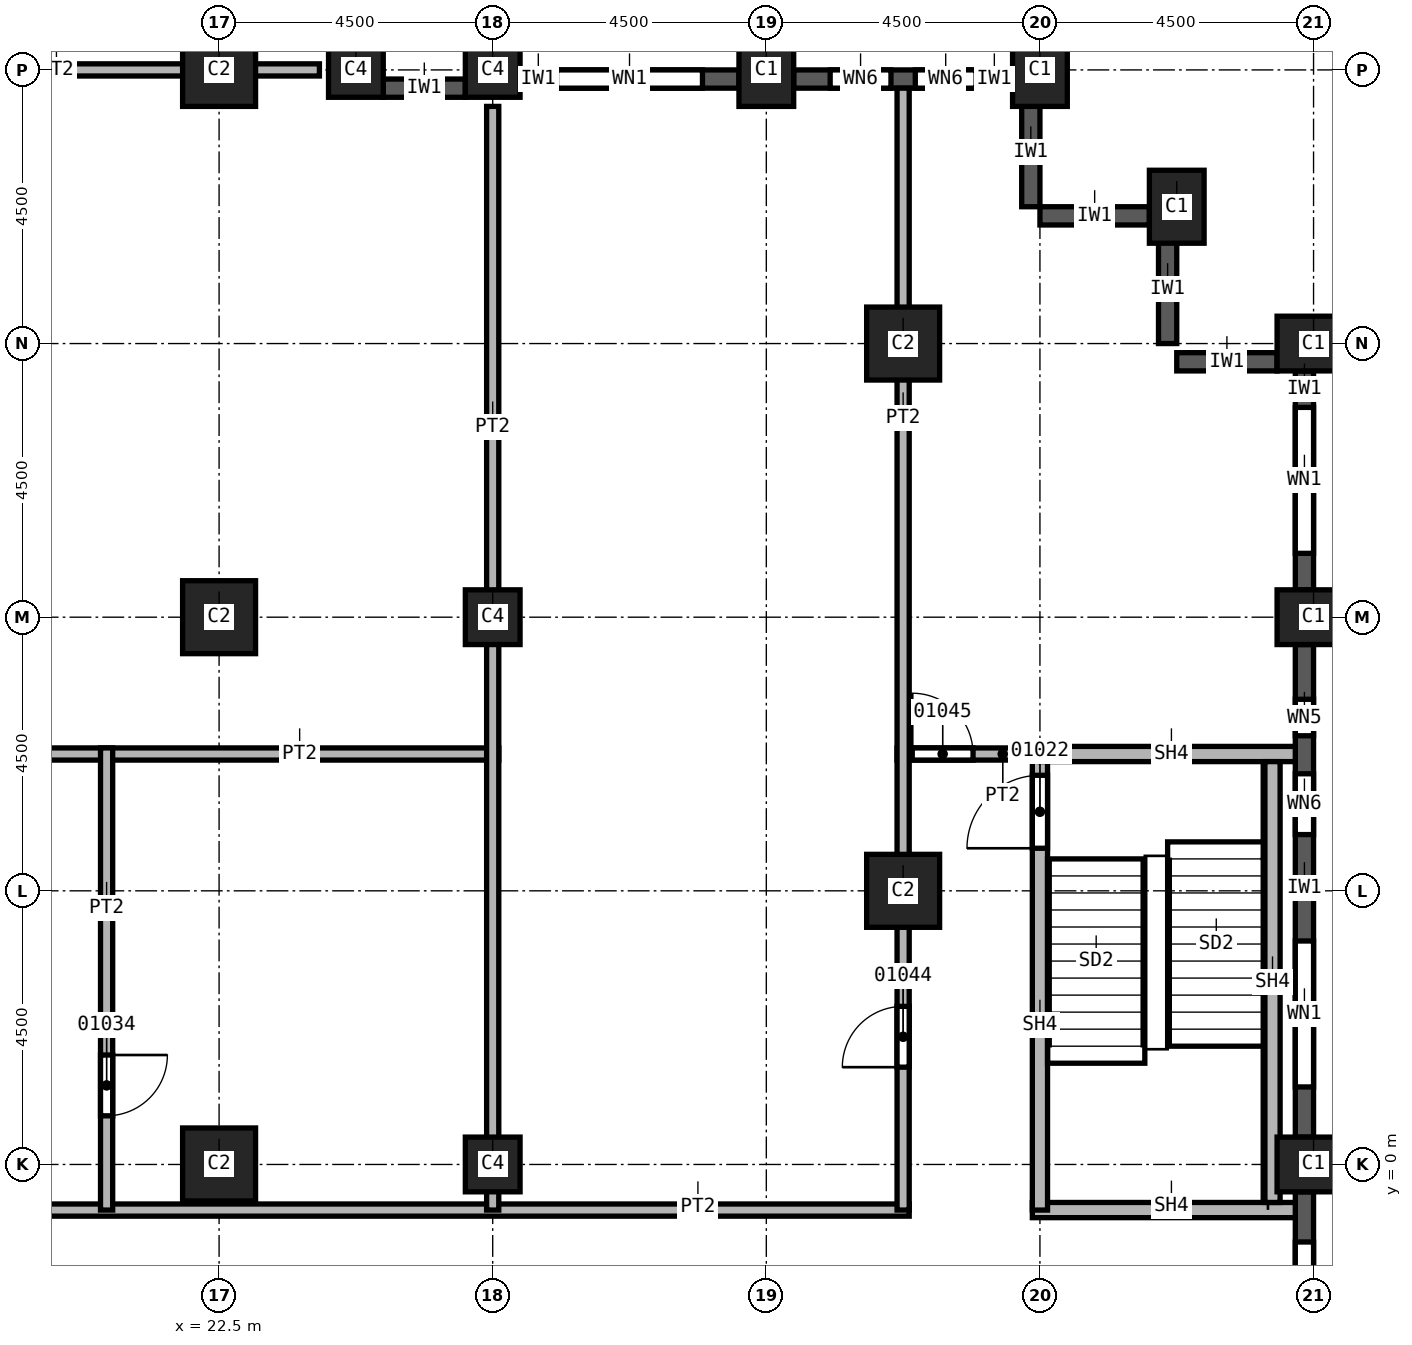
"""IFC4 building model, lengths in metres.
Left out: names, types, materials, properties, quantities, classifications, styles, units other than length and angle.
Written with IfcOpenShell. Run it as: python <this file> out.ifc"""

import sys

from ifc_helpers import new_model, si_unit, direction, frame, frame_2d, origin, origin_2d, place, context, subcontext, project, spatial, rectangle, extrude, element, fill, save


model = new_model("IFC4")
c1 = context("Model", 3, precision=1e-05, world=origin(), true_north=direction((0.0, 1.0)))
c2 = subcontext(c1, "Body", "Model", "MODEL_VIEW")
j1 = project(units=[si_unit("LENGTHUNIT", "METRE"), si_unit("PLANEANGLEUNIT", "RADIAN")], contexts=[c1])
p1 = place(None, origin())
s1 = spatial("IfcSite", under=j1, at=p1, CompositionType="ELEMENT")
p2 = place(p1, origin())
s2 = spatial("IfcBuilding", under=s1, at=p2, CompositionType="ELEMENT")
p3 = place(p2, frame((0.0, 0.0, 72.0)))
s3 = spatial("IfcBuildingStorey", under=s2, at=p3, CompositionType="ELEMENT", Elevation=72.0)
for number, where, z_axis, x_axis in (
    (1, (40.5, 0.0, 0.0), (0.0, 0.0, 1.0), (0.0, 1.0, 0.0)),
    (2, (40.5, 9.0, 0.0), (0.0, 0.0, 1.0), (0.0, 1.0, 0.0)),
    (3, (40.5, 13.5, 0.0), (0.0, 0.0, 1.0), (0.0, 1.0, 0.0)),
    (4, (38.25, 15.75, 0.0), (0.0, 0.0, 1.0), (1.0, 0.0, 0.0)),
    (5, (31.5, 18.0, 0.0), (0.0, 0.0, 1.0), (1.0, 0.0, 0.0)),
    (6, (36.0, 18.0, 0.0), (0.0, 0.0, 1.0), (1.0, 0.0, 0.0)),
):
    element("IfcColumn", number, at=place(p3, frame(where, z_axis=z_axis, x_axis=x_axis)), inside=s3, PredefinedType="COLUMN", context=c2, shape_type="SweptSolid", body=[
        extrude(rectangle(XDim=0.9, YDim=1.2, at=origin_2d()), origin(), (0.0, 0.0, 1.0), 3.7),
    ])
for number, where, z_axis, x_axis in (
    (7, (33.75, 4.5, 0.0), (0.0, 0.0, 1.0), (1.0, 0.0, 0.0)),
    (8, (33.75, 13.5, 0.0), (0.0, 0.0, 1.0), (1.0, 0.0, 0.0)),
    (9, (22.5, 0.0, 0.0), (0.0, 0.0, 1.0), (1.0, 0.0, 0.0)),
    (10, (22.5, 9.0, 0.0), (0.0, 0.0, 1.0), (1.0, 0.0, 0.0)),
    (11, (22.5, 18.0, 0.0), (0.0, 0.0, 1.0), (1.0, 0.0, 0.0)),
):
    element("IfcColumn", number, at=place(p3, frame(where, z_axis=z_axis, x_axis=x_axis)), inside=s3, PredefinedType="COLUMN", context=c2, shape_type="SweptSolid", body=[
        extrude(rectangle(XDim=1.2, YDim=1.2, at=origin_2d()), origin(), (0.0, 0.0, 1.0), 3.7),
    ])
for number, where, z_axis, x_axis in (
    (12, (27.0, 0.0, 0.0), (0.0, 0.0, 1.0), (1.0, 0.0, 0.0)),
    (13, (27.0, 9.0, 0.0), (0.0, 0.0, 1.0), (1.0, 0.0, 0.0)),
    (14, (27.0, 18.0, 0.0), (0.0, 0.0, 1.0), (1.0, 0.0, 0.0)),
    (15, (24.75, 18.0, 0.0), (0.0, 0.0, 1.0), (1.0, 0.0, 0.0)),
):
    element("IfcColumn", number, at=place(p3, frame(where, z_axis=z_axis, x_axis=x_axis)), inside=s3, PredefinedType="COLUMN", context=c2, shape_type="SweptSolid", body=[
        extrude(rectangle(XDim=0.9, YDim=0.9, at=origin_2d()), origin(), (0.0, 0.0, 1.0), 3.7),
    ])
p4 = place(p3, frame((39.9, 13.2, 0.0), z_axis=(0.0, 0.0, 1.0), x_axis=(-1.0, 0.0, 0.0)))
e16 = element("IfcWall", 16, at=p4, inside=s3, PredefinedType="SOLIDWALL", context=c2, shape_type="SweptSolid", body=[
    extrude(rectangle(XDim=1.65, YDim=0.3, at=frame_2d((0.825, 0.0))), origin(), (0.0, 0.0, 1.0), 3.1),
])
for number, where, z_axis, x_axis in (
    (17, (38.1, 15.3, 0.0), (0.0, 0.0, 1.0), (0.0, -1.0, 0.0)),
    (18, (37.8, 15.6, 0.0), (0.0, 0.0, 1.0), (-1.0, 0.0, 0.0)),
    (19, (35.85, 17.55, 0.0), (0.0, 0.0, 1.0), (0.0, -1.0, 0.0)),
):
    element("IfcWall", number, at=place(p3, frame(where, z_axis=z_axis, x_axis=x_axis)), inside=s3, PredefinedType="SOLIDWALL", context=c2, shape_type="SweptSolid", body=[
        extrude(rectangle(XDim=1.8, YDim=0.3, at=frame_2d((0.9, 0.0))), origin(), (0.0, 0.0, 1.0), 3.1),
    ])
p5 = place(p3, frame((40.35, -8.55, 0.0), z_axis=(0.0, 0.0, 1.0), x_axis=(0.0, 1.0, 0.0)))
e20 = element("IfcWall", 20, at=p5, inside=s3, PredefinedType="SOLIDWALL", context=c2, shape_type="SweptSolid", body=[
    extrude(rectangle(XDim=8.1, YDim=0.3, at=frame_2d((4.05, 0.0))), origin(), (0.0, 0.0, 1.0), 3.1),
])
p6 = place(p5, frame((0.825, 0.0, 0.8)))
e21 = element("IfcOpeningElement", 21, at=p6, cuts=e20, PredefinedType="OPENING", context=c2, shape_type="SweptSolid", body=[
    extrude(rectangle(XDim=2.4, YDim=1.95, at=frame_2d((1.2, 0.975))), frame((0.0, 0.15, 0.0), z_axis=(0.0, -1.0, 0.0), x_axis=(1.0, 0.0, 0.0)), (0.0, 0.0, 1.0), 0.3),
])
p7 = place(p5, frame((4.875, 0.0, 0.8)))
e22 = element("IfcOpeningElement", 22, at=p7, cuts=e20, PredefinedType="OPENING", context=c2, shape_type="SweptSolid", body=[
    extrude(rectangle(XDim=2.4, YDim=1.95, at=frame_2d((1.2, 0.975))), frame((0.0, 0.15, 0.0), z_axis=(0.0, -1.0, 0.0), x_axis=(1.0, 0.0, 0.0)), (0.0, 0.0, 1.0), 0.3),
])
p8 = place(p3, frame((40.35, 0.45, 0.0), z_axis=(0.0, 0.0, 1.0), x_axis=(0.0, 1.0, 0.0)))
e23 = element("IfcWall", 23, at=p8, inside=s3, PredefinedType="SOLIDWALL", context=c2, shape_type="SweptSolid", body=[
    extrude(rectangle(XDim=8.1, YDim=0.3, at=frame_2d((4.05, 0.0))), origin(), (0.0, 0.0, 1.0), 3.1),
])
p9 = place(p8, frame((0.825, 0.0, 0.8)))
e24 = element("IfcOpeningElement", 24, at=p9, cuts=e23, PredefinedType="OPENING", context=c2, shape_type="SweptSolid", body=[
    extrude(rectangle(XDim=2.4, YDim=1.95, at=frame_2d((1.2, 0.975))), frame((0.0, 0.15, 0.0), z_axis=(0.0, -1.0, 0.0), x_axis=(1.0, 0.0, 0.0)), (0.0, 0.0, 1.0), 0.3),
])
p10 = place(p8, frame((4.975, 0.0, 0.8)))
e25 = element("IfcOpeningElement", 25, at=p10, cuts=e23, PredefinedType="OPENING", context=c2, shape_type="SweptSolid", body=[
    extrude(rectangle(XDim=1.0, YDim=1.95, at=frame_2d((0.5, 0.975))), frame((0.0, 0.15, 0.0), z_axis=(0.0, -1.0, 0.0), x_axis=(1.0, 0.0, 0.0)), (0.0, 0.0, 1.0), 0.3),
])
p11 = place(p8, frame((6.6, 0.0, 0.8)))
e26 = element("IfcOpeningElement", 26, at=p11, cuts=e23, PredefinedType="OPENING", context=c2, shape_type="SweptSolid", body=[
    extrude(rectangle(XDim=0.6, YDim=1.95, at=frame_2d((0.3, 0.975))), frame((0.0, 0.15, 0.0), z_axis=(0.0, -1.0, 0.0), x_axis=(1.0, 0.0, 0.0)), (0.0, 0.0, 1.0), 0.3),
])
p12 = place(p3, frame((40.35, 9.45, 0.0), z_axis=(0.0, 0.0, 1.0), x_axis=(0.0, 1.0, 0.0)))
e27 = element("IfcWall", 27, at=p12, inside=s3, PredefinedType="SOLIDWALL", context=c2, shape_type="SweptSolid", body=[
    extrude(rectangle(XDim=3.6, YDim=0.3, at=frame_2d((1.8, 0.0))), origin(), (0.0, 0.0, 1.0), 3.1),
])
p13 = place(p12, frame((0.6, 0.0, 0.8)))
e28 = element("IfcOpeningElement", 28, at=p13, cuts=e27, PredefinedType="OPENING", context=c2, shape_type="SweptSolid", body=[
    extrude(rectangle(XDim=2.4, YDim=1.95, at=frame_2d((1.2, 0.975))), frame((0.0, 0.15, 0.0), z_axis=(0.0, -1.0, 0.0), x_axis=(1.0, 0.0, 0.0)), (0.0, 0.0, 1.0), 0.3),
])
p14 = place(p3, frame((35.55, 17.85, 0.0), z_axis=(0.0, 0.0, 1.0), x_axis=(-1.0, 0.0, 0.0)))
e29 = element("IfcWall", 29, at=p14, inside=s3, PredefinedType="SOLIDWALL", context=c2, shape_type="SweptSolid", body=[
    extrude(rectangle(XDim=3.6, YDim=0.3, at=frame_2d((1.8, 0.0))), origin(), (0.0, 0.0, 1.0), 3.1),
])
p15 = place(p14, frame((0.6, 0.0, 0.8)))
e30 = element("IfcOpeningElement", 30, at=p15, cuts=e29, PredefinedType="OPENING", context=c2, shape_type="SweptSolid", body=[
    extrude(rectangle(XDim=1.0, YDim=1.95, at=frame_2d((0.5, 0.975))), frame((0.0, 0.15, 0.0), z_axis=(0.0, -1.0, 0.0), x_axis=(1.0, 0.0, 0.0)), (0.0, 0.0, 1.0), 0.3),
])
p16 = place(p14, frame((2.0, 0.0, 0.8)))
e31 = element("IfcOpeningElement", 31, at=p16, cuts=e29, PredefinedType="OPENING", context=c2, shape_type="SweptSolid", body=[
    extrude(rectangle(XDim=1.0, YDim=1.95, at=frame_2d((0.5, 0.975))), frame((0.0, 0.15, 0.0), z_axis=(0.0, -1.0, 0.0), x_axis=(1.0, 0.0, 0.0)), (0.0, 0.0, 1.0), 0.3),
])
p17 = place(p3, frame((31.05, 17.85, 0.0), z_axis=(0.0, 0.0, 1.0), x_axis=(-1.0, 0.0, 0.0)))
e32 = element("IfcWall", 32, at=p17, inside=s3, PredefinedType="SOLIDWALL", context=c2, shape_type="SweptSolid", body=[
    extrude(rectangle(XDim=3.6, YDim=0.3, at=frame_2d((1.8, 0.0))), origin(), (0.0, 0.0, 1.0), 3.1),
])
p18 = place(p17, frame((0.6, 0.0, 0.8)))
e33 = element("IfcOpeningElement", 33, at=p18, cuts=e32, PredefinedType="OPENING", context=c2, shape_type="SweptSolid", body=[
    extrude(rectangle(XDim=2.4, YDim=1.95, at=frame_2d((1.2, 0.975))), frame((0.0, 0.15, 0.0), z_axis=(0.0, -1.0, 0.0), x_axis=(1.0, 0.0, 0.0)), (0.0, 0.0, 1.0), 0.3),
])
p19 = place(p3, frame((26.55, 17.7, 0.0), z_axis=(0.0, 0.0, 1.0), x_axis=(-1.0, 0.0, 0.0)))
e34 = element("IfcWall", 34, at=p19, inside=s3, PredefinedType="SOLIDWALL", context=c2, shape_type="SweptSolid", body=[
    extrude(rectangle(XDim=1.35, YDim=0.3, at=frame_2d((0.675, 0.0))), origin(), (0.0, 0.0, 1.0), 3.1),
])
p20 = place(p3, frame((15.4, -0.75, 0.0), z_axis=(0.0, 0.0, 1.0), x_axis=(1.0, 0.0, 0.0)))
e35 = element("IfcWall", 35, at=p20, inside=s3, PredefinedType="PARTITIONING", context=c2, shape_type="SweptSolid", body=[
    extrude(rectangle(XDim=18.45, YDim=0.2, at=frame_2d((9.225, 0.0))), origin(), (0.0, 0.0, 1.0), 3.7),
])
p21 = place(p3, frame((15.4, 6.75, 0.0), z_axis=(0.0, 0.0, 1.0), x_axis=(1.0, 0.0, 0.0)))
e36 = element("IfcWall", 36, at=p21, inside=s3, PredefinedType="PARTITIONING", context=c2, shape_type="SweptSolid", body=[
    extrude(rectangle(XDim=11.7, YDim=0.2, at=frame_2d((5.85, 0.0))), origin(), (0.0, 0.0, 1.0), 3.7),
])
p22 = place(p3, frame((15.4, 18.0, 0.0), z_axis=(0.0, 0.0, 1.0), x_axis=(1.0, 0.0, 0.0)))
e37 = element("IfcWall", 37, at=p22, inside=s3, PredefinedType="PARTITIONING", context=c2, shape_type="SweptSolid", body=[
    extrude(rectangle(XDim=8.75, YDim=0.2, at=frame_2d((4.375, 0.0))), origin(), (0.0, 0.0, 1.0), 3.7),
])
p23 = place(p3, frame((20.65, 6.85, 0.0), z_axis=(0.0, 0.0, 1.0), x_axis=(0.0, -1.0, 0.0)))
e38 = element("IfcWall", 38, at=p23, inside=s3, PredefinedType="PARTITIONING", context=c2, shape_type="SweptSolid", body=[
    extrude(rectangle(XDim=7.6, YDim=0.2, at=frame_2d((3.8, 0.0))), origin(), (0.0, 0.0, 1.0), 3.7),
])
p24 = place(p23, frame((5.05, 0.0, 0.0)))
e39 = element("IfcOpeningElement", 39, at=p24, cuts=e38, PredefinedType="OPENING", context=c2, shape_type="SweptSolid", body=[
    extrude(rectangle(XDim=1.0, YDim=2.1, at=frame_2d((0.5, 1.05))), frame((0.0, 0.1, 0.0), z_axis=(0.0, -1.0, 0.0), x_axis=(1.0, 0.0, 0.0)), (0.0, 0.0, 1.0), 0.2),
])
p25 = place(p3, frame((27.0, 17.4, 0.0), z_axis=(0.0, 0.0, 1.0), x_axis=(0.0, -1.0, 0.0)))
e40 = element("IfcWall", 40, at=p25, inside=s3, PredefinedType="PARTITIONING", context=c2, shape_type="SweptSolid", body=[
    extrude(rectangle(XDim=18.15, YDim=0.2, at=frame_2d((9.075, 0.0))), origin(), (0.0, 0.0, 1.0), 3.7),
])
p26 = place(p3, frame((33.65, 6.75, 0.0), z_axis=(0.0, 0.0, 1.0), x_axis=(1.0, 0.0, 0.0)))
e41 = element("IfcWall", 41, at=p26, inside=s3, PredefinedType="PARTITIONING", context=c2, shape_type="SweptSolid", body=[
    extrude(rectangle(XDim=2.35, YDim=0.2, at=frame_2d((1.175, 0.0))), origin(), (0.0, 0.0, 1.0), 3.7),
])
p27 = place(p26, frame((0.25, 0.0, 0.0)))
e42 = element("IfcOpeningElement", 42, at=p27, cuts=e41, PredefinedType="OPENING", context=c2, shape_type="SweptSolid", body=[
    extrude(rectangle(XDim=1.0, YDim=2.1, at=frame_2d((0.5, 1.05))), frame((0.0, 0.1, 0.0), z_axis=(0.0, -1.0, 0.0), x_axis=(1.0, 0.0, 0.0)), (0.0, 0.0, 1.0), 0.2),
])
p28 = place(p3, frame((33.75, -0.75, 0.0), z_axis=(0.0, 0.0, 1.0), x_axis=(0.0, 1.0, 0.0)))
e43 = element("IfcWall", 43, at=p28, inside=s3, PredefinedType="PARTITIONING", context=c2, shape_type="SweptSolid", body=[
    extrude(rectangle(XDim=18.45, YDim=0.2, at=frame_2d((9.225, 0.0))), origin(), (0.0, 0.0, 1.0), 3.7),
])
p29 = place(p28, frame((2.35, 0.0, 0.0)))
e44 = element("IfcOpeningElement", 44, at=p29, cuts=e43, PredefinedType="OPENING", context=c2, shape_type="SweptSolid", body=[
    extrude(rectangle(XDim=1.0, YDim=2.1, at=frame_2d((0.5, 1.05))), frame((0.0, 0.1, 0.0), z_axis=(0.0, -1.0, 0.0), x_axis=(1.0, 0.0, 0.0)), (0.0, 0.0, 1.0), 0.2),
])
p30 = place(p3, frame((35.875, -0.75, 0.0), z_axis=(0.0, 0.0, 1.0), x_axis=(1.0, 0.0, 0.0)))
e45 = element("IfcWall", 45, at=p30, inside=s3, PredefinedType="SOLIDWALL", context=c2, shape_type="SweptSolid", body=[
    extrude(rectangle(XDim=4.325, YDim=0.25, at=frame_2d((2.163, 0.0))), origin(), (0.0, 0.0, 1.0), 3.7),
])
p31 = place(p3, frame((36.0, -0.75, 0.0), z_axis=(0.0, 0.0, 1.0), x_axis=(0.0, 1.0, 0.0)))
e46 = element("IfcWall", 46, at=p31, inside=s3, PredefinedType="SOLIDWALL", context=c2, shape_type="SweptSolid", body=[
    extrude(rectangle(XDim=7.625, YDim=0.25, at=frame_2d((3.812, 0.0))), origin(), (0.0, 0.0, 1.0), 3.7),
])
p32 = place(p31, frame((5.95, 0.0, 0.0)))
e47 = element("IfcOpeningElement", 47, at=p32, cuts=e46, PredefinedType="OPENING", context=c2, shape_type="SweptSolid", body=[
    extrude(rectangle(XDim=1.2, YDim=2.1, at=frame_2d((0.6, 1.05))), frame((0.0, 0.125, 0.0), z_axis=(0.0, -1.0, 0.0), x_axis=(1.0, 0.0, 0.0)), (0.0, 0.0, 1.0), 0.25),
])
p33 = place(p3, frame((36.0, 6.75, 0.0), z_axis=(0.0, 0.0, 1.0), x_axis=(1.0, 0.0, 0.0)))
e48 = element("IfcWall", 48, at=p33, inside=s3, PredefinedType="SOLIDWALL", context=c2, shape_type="SweptSolid", body=[
    extrude(rectangle(XDim=4.2, YDim=0.25, at=frame_2d((2.1, 0.0))), origin(), (0.0, 0.0, 1.0), 3.7),
])
p34 = place(p3, frame((39.825, -0.625, 0.0), z_axis=(0.0, 0.0, 1.0), x_axis=(0.0, 1.0, 0.0)))
e49 = element("IfcWall", 49, at=p34, inside=s3, PredefinedType="SOLIDWALL", context=c2, shape_type="SweptSolid", body=[
    extrude(rectangle(XDim=7.25, YDim=0.25, at=frame_2d((3.625, 0.0))), origin(), (0.0, 0.0, 1.0), 3.7),
])
p35 = place(p7, origin())
e50 = element("IfcWindow", 50, at=p35, inside=s3, PartitioningType="SINGLE_PANEL", PredefinedType="WINDOW", context=c2, shape_type="SweptSolid", body=[
    extrude(rectangle(XDim=2.4, YDim=1.95, at=frame_2d((1.2, 0.975))), frame((0.0, 0.03, 0.0), z_axis=(0.0, -1.0, 0.0), x_axis=(1.0, 0.0, 0.0)), (0.0, 0.0, 1.0), 0.06),
])
fill(e22, e50)
p36 = place(p9, origin())
e51 = element("IfcWindow", 51, at=p36, inside=s3, PartitioningType="SINGLE_PANEL", PredefinedType="WINDOW", context=c2, shape_type="SweptSolid", body=[
    extrude(rectangle(XDim=2.4, YDim=1.95, at=frame_2d((1.2, 0.975))), frame((0.0, 0.03, 0.0), z_axis=(0.0, -1.0, 0.0), x_axis=(1.0, 0.0, 0.0)), (0.0, 0.0, 1.0), 0.06),
])
fill(e24, e51)
p37 = place(p13, origin())
e52 = element("IfcWindow", 52, at=p37, inside=s3, PartitioningType="SINGLE_PANEL", PredefinedType="WINDOW", context=c2, shape_type="SweptSolid", body=[
    extrude(rectangle(XDim=2.4, YDim=1.95, at=frame_2d((1.2, 0.975))), frame((0.0, 0.03, 0.0), z_axis=(0.0, -1.0, 0.0), x_axis=(1.0, 0.0, 0.0)), (0.0, 0.0, 1.0), 0.06),
])
fill(e28, e52)
p38 = place(p18, origin())
e53 = element("IfcWindow", 53, at=p38, inside=s3, PartitioningType="SINGLE_PANEL", PredefinedType="WINDOW", context=c2, shape_type="SweptSolid", body=[
    extrude(rectangle(XDim=2.4, YDim=1.95, at=frame_2d((1.2, 0.975))), frame((0.0, 0.03, 0.0), z_axis=(0.0, -1.0, 0.0), x_axis=(1.0, 0.0, 0.0)), (0.0, 0.0, 1.0), 0.06),
])
fill(e33, e53)
p39 = place(p32, origin())
e54 = element("IfcDoor", 54, at=p39, inside=s3, OperationType="SINGLE_SWING_LEFT", PredefinedType="DOOR", context=c2, shape_type="SweptSolid", body=[
    extrude(rectangle(XDim=1.2, YDim=2.1, at=frame_2d((0.6, 1.05))), frame((0.0, 0.025, 0.0), z_axis=(0.0, -1.0, 0.0), x_axis=(1.0, 0.0, 0.0)), (0.0, 0.0, 1.0), 0.05),
])
fill(e47, e54)
p40 = place(p24, origin())
e55 = element("IfcDoor", 55, at=p40, inside=s3, OperationType="SINGLE_SWING_LEFT", PredefinedType="DOOR", context=c2, shape_type="SweptSolid", body=[
    extrude(rectangle(XDim=1.0, YDim=2.1, at=frame_2d((0.5, 1.05))), frame((0.0, 0.025, 0.0), z_axis=(0.0, -1.0, 0.0), x_axis=(1.0, 0.0, 0.0)), (0.0, 0.0, 1.0), 0.05),
])
fill(e39, e55)
p41 = place(p29, origin())
e56 = element("IfcDoor", 56, at=p41, inside=s3, OperationType="SINGLE_SWING_LEFT", PredefinedType="DOOR", context=c2, shape_type="SweptSolid", body=[
    extrude(rectangle(XDim=1.0, YDim=2.1, at=frame_2d((0.5, 1.05))), frame((0.0, 0.025, 0.0), z_axis=(0.0, -1.0, 0.0), x_axis=(1.0, 0.0, 0.0)), (0.0, 0.0, 1.0), 0.05),
])
fill(e44, e56)
p42 = place(p27, origin())
e57 = element("IfcDoor", 57, at=p42, inside=s3, OperationType="SINGLE_SWING_RIGHT", PredefinedType="DOOR", context=c2, shape_type="SweptSolid", body=[
    extrude(rectangle(XDim=1.0, YDim=2.1, at=frame_2d((0.5, 1.05))), frame((0.0, 0.025, 0.0), z_axis=(0.0, -1.0, 0.0), x_axis=(1.0, 0.0, 0.0)), (0.0, 0.0, 1.0), 0.05),
])
fill(e42, e57)
p43 = place(p10, origin())
e58 = element("IfcWindow", 58, at=p43, inside=s3, PartitioningType="SINGLE_PANEL", PredefinedType="WINDOW", context=c2, shape_type="SweptSolid", body=[
    extrude(rectangle(XDim=1.0, YDim=1.95, at=frame_2d((0.5, 0.975))), frame((0.0, 0.03, 0.0), z_axis=(0.0, -1.0, 0.0), x_axis=(1.0, 0.0, 0.0)), (0.0, 0.0, 1.0), 0.06),
])
fill(e25, e58)
p44 = place(p11, origin())
e59 = element("IfcWindow", 59, at=p44, inside=s3, PartitioningType="SINGLE_PANEL", PredefinedType="WINDOW", context=c2, shape_type="SweptSolid", body=[
    extrude(rectangle(XDim=0.6, YDim=1.95, at=frame_2d((0.3, 0.975))), frame((0.0, 0.03, 0.0), z_axis=(0.0, -1.0, 0.0), x_axis=(1.0, 0.0, 0.0)), (0.0, 0.0, 1.0), 0.06),
])
fill(e26, e59)
p45 = place(p15, origin())
e60 = element("IfcWindow", 60, at=p45, inside=s3, PartitioningType="SINGLE_PANEL", PredefinedType="WINDOW", context=c2, shape_type="SweptSolid", body=[
    extrude(rectangle(XDim=1.0, YDim=1.95, at=frame_2d((0.5, 0.975))), frame((0.0, 0.03, 0.0), z_axis=(0.0, -1.0, 0.0), x_axis=(1.0, 0.0, 0.0)), (0.0, 0.0, 1.0), 0.06),
])
fill(e30, e60)
p46 = place(p16, origin())
e61 = element("IfcWindow", 61, at=p46, inside=s3, PartitioningType="SINGLE_PANEL", PredefinedType="WINDOW", context=c2, shape_type="SweptSolid", body=[
    extrude(rectangle(XDim=1.0, YDim=1.95, at=frame_2d((0.5, 0.975))), frame((0.0, 0.03, 0.0), z_axis=(0.0, -1.0, 0.0), x_axis=(1.0, 0.0, 0.0)), (0.0, 0.0, 1.0), 0.06),
])
fill(e31, e61)
save(model, sys.argv[1])
